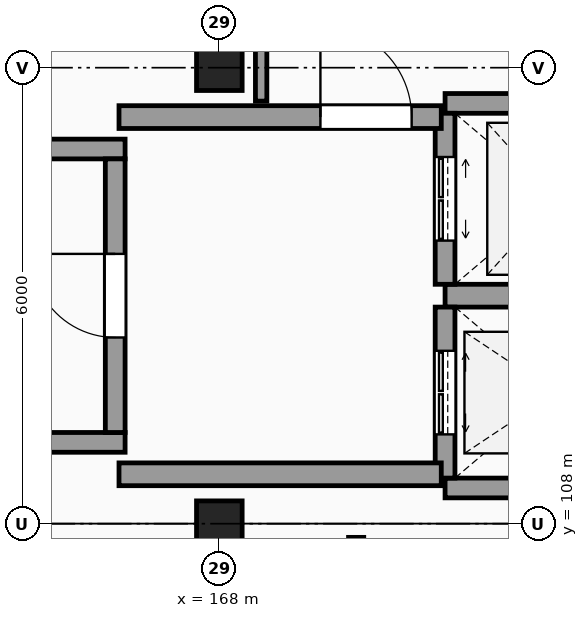
"""IFC4 building model, lengths in metres.
Left out: names, types, materials, properties, quantities, classifications, styles, units other than length and angle.
Written with IfcOpenShell. Run it as: python <this file> out.ifc"""

import sys

from ifc_helpers import new_model, si_unit, direction, frame, frame_2d, origin, origin_2d, place, context, subcontext, project, spatial, rectangle, extrude, element, fill, save


model = new_model("IFC4")
c1 = context("Model", 3, precision=1e-05, world=origin(), true_north=direction((0.0, 1.0)))
c2 = subcontext(c1, "Body", "Model", "MODEL_VIEW")
j1 = project(units=[si_unit("LENGTHUNIT", "METRE"), si_unit("PLANEANGLEUNIT", "RADIAN")], contexts=[c1])
p1 = place(None, origin())
s1 = spatial("IfcSite", under=j1, at=p1, CompositionType="ELEMENT")
p2 = place(p1, origin())
s2 = spatial("IfcBuilding", under=s1, at=p2, CompositionType="ELEMENT")
p3 = place(p2, frame((0.0, 0.0, 24.6)))
s3 = spatial("IfcBuildingStorey", under=s2, at=p3, CompositionType="ELEMENT", Elevation=24.6)
for number, where, z_axis, x_axis in (
    (1, (168.0, 108.0, 0.0), (0.0, 0.0, 1.0), (1.0, 0.0, 0.0)),
    (2, (168.0, 114.0, 0.0), (0.0, 0.0, 1.0), (1.0, 0.0, 0.0)),
):
    element("IfcColumn", number, at=place(p3, frame(where, z_axis=z_axis, x_axis=x_axis)), inside=s3, PredefinedType="COLUMN", context=c2, shape_type="SweptSolid", body=[
        extrude(rectangle(XDim=0.6, YDim=0.6, at=origin_2d()), origin(), (0.0, 0.0, 1.0), 3.6),
    ])
for number, where, z_axis, x_axis in (
    (3, (156.04, 109.07, 0.0), (0.0, 0.0, 1.0), (1.0, 0.0, 0.0)),
    (4, (156.04, 112.93, 0.0), (0.0, 0.0, 1.0), (1.0, 0.0, 0.0)),
):
    element("IfcWall", number, at=place(p3, frame(where, z_axis=z_axis, x_axis=x_axis)), inside=s3, PredefinedType="SHEAR", context=c2, shape_type="SweptSolid", body=[
        extrude(rectangle(XDim=10.72, YDim=0.26, at=frame_2d((5.36, 0.0))), origin(), (0.0, 0.0, 1.0), 3.6),
    ])
p4 = place(p3, frame((166.63, 109.2, 0.0), z_axis=(0.0, 0.0, 1.0), x_axis=(0.0, 1.0, 0.0)))
e5 = element("IfcWall", 5, at=p4, inside=s3, PredefinedType="SHEAR", context=c2, shape_type="SweptSolid", body=[
    extrude(rectangle(XDim=3.6, YDim=0.26, at=frame_2d((1.8, 0.0))), origin(), (0.0, 0.0, 1.0), 3.6),
])
p5 = place(p4, frame((1.25, 0.0, 0.0)))
e6 = element("IfcOpeningElement", 6, at=p5, cuts=e5, PredefinedType="OPENING", context=c2, shape_type="SweptSolid", body=[
    extrude(rectangle(XDim=1.1, YDim=2.15, at=frame_2d((0.55, 1.075))), frame((0.0, 0.14, 0.0), z_axis=(0.0, -1.0, 0.0), x_axis=(1.0, 0.0, 0.0)), (0.0, 0.0, 1.0), 0.28),
])
p6 = place(p3, frame((170.97, 108.47, 0.0), z_axis=(0.0, 0.0, 1.0), x_axis=(1.0, 0.0, 0.0)))
e7 = element("IfcWall", 7, at=p6, inside=s3, PredefinedType="SHEAR", context=c2, shape_type="SweptSolid", body=[
    extrude(rectangle(XDim=2.91, YDim=0.26, at=frame_2d((1.455, 0.0))), origin(), (0.0, 0.0, 1.0), 3.6),
])
p7 = place(p3, frame((170.97, 111.0, 0.0), z_axis=(0.0, 0.0, 1.0), x_axis=(1.0, 0.0, 0.0)))
e8 = element("IfcWall", 8, at=p7, inside=s3, PredefinedType="SHEAR", context=c2, shape_type="SweptSolid", body=[
    extrude(rectangle(XDim=2.91, YDim=0.3, at=frame_2d((1.455, 0.0))), origin(), (0.0, 0.0, 1.0), 3.6),
])
p8 = place(p3, frame((170.97, 108.6, 0.0), z_axis=(0.0, 0.0, 1.0), x_axis=(0.0, 1.0, 0.0)))
e9 = element("IfcWall", 9, at=p8, inside=s3, PredefinedType="SHEAR", context=c2, shape_type="SweptSolid", body=[
    extrude(rectangle(XDim=2.25, YDim=0.26, at=frame_2d((1.125, 0.0))), origin(), (0.0, 0.0, 1.0), 3.6),
])
p9 = place(p8, frame((0.575, 0.0, 0.0)))
e10 = element("IfcOpeningElement", 10, at=p9, cuts=e9, PredefinedType="OPENING", context=c2, shape_type="SweptSolid", body=[
    extrude(rectangle(XDim=1.1, YDim=2.2, at=frame_2d((0.55, 1.1))), frame((0.0, 0.14, 0.0), z_axis=(0.0, -1.0, 0.0), x_axis=(1.0, 0.0, 0.0)), (0.0, 0.0, 1.0), 0.28),
])
p10 = place(p3, frame((170.97, 113.53, 0.0), z_axis=(0.0, 0.0, 1.0), x_axis=(1.0, 0.0, 0.0)))
e11 = element("IfcWall", 11, at=p10, inside=s3, PredefinedType="SHEAR", context=c2, shape_type="SweptSolid", body=[
    extrude(rectangle(XDim=2.91, YDim=0.26, at=frame_2d((1.455, 0.0))), origin(), (0.0, 0.0, 1.0), 3.6),
])
p11 = place(p3, frame((170.97, 111.15, 0.0), z_axis=(0.0, 0.0, 1.0), x_axis=(0.0, 1.0, 0.0)))
e12 = element("IfcWall", 12, at=p11, inside=s3, PredefinedType="SHEAR", context=c2, shape_type="SweptSolid", body=[
    extrude(rectangle(XDim=2.25, YDim=0.26, at=frame_2d((1.125, 0.0))), origin(), (0.0, 0.0, 1.0), 3.6),
])
p12 = place(p11, frame((0.575, 0.0, 0.0)))
e13 = element("IfcOpeningElement", 13, at=p12, cuts=e12, PredefinedType="OPENING", context=c2, shape_type="SweptSolid", body=[
    extrude(rectangle(XDim=1.1, YDim=2.2, at=frame_2d((0.55, 1.1))), frame((0.0, 0.14, 0.0), z_axis=(0.0, -1.0, 0.0), x_axis=(1.0, 0.0, 0.0)), (0.0, 0.0, 1.0), 0.28),
])
p13 = place(p3, frame((166.68, 113.35, 0.0), z_axis=(0.0, 0.0, 1.0), x_axis=(1.0, 0.0, 0.0)))
e14 = element("IfcWall", 14, at=p13, inside=s3, PredefinedType="SHEAR", context=c2, shape_type="SweptSolid", body=[
    extrude(rectangle(XDim=4.24, YDim=0.3, at=frame_2d((2.12, 0.0))), origin(), (0.0, 0.0, 1.0), 3.6),
])
p14 = place(p13, frame((2.65, 0.0, 0.0)))
e15 = element("IfcOpeningElement", 15, at=p14, cuts=e14, PredefinedType="OPENING", context=c2, shape_type="SweptSolid", body=[
    extrude(rectangle(XDim=1.2, YDim=2.2, at=frame_2d((0.6, 1.1))), frame((0.0, 0.16, 0.0), z_axis=(0.0, -1.0, 0.0), x_axis=(1.0, 0.0, 0.0)), (0.0, 0.0, 1.0), 0.32),
])
p15 = place(p3, frame((166.68, 108.65, 0.0), z_axis=(0.0, 0.0, 1.0), x_axis=(1.0, 0.0, 0.0)))
e16 = element("IfcWall", 16, at=p15, inside=s3, PredefinedType="SHEAR", context=c2, shape_type="SweptSolid", body=[
    extrude(rectangle(XDim=4.24, YDim=0.3, at=frame_2d((2.12, 0.0))), origin(), (0.0, 0.0, 1.0), 3.6),
])
p16 = place(p3, frame((168.55, 113.56, 0.0), z_axis=(0.0, 0.0, 1.0), x_axis=(0.0, 1.0, 0.0)))
e17 = element("IfcWall", 17, at=p16, inside=s3, PredefinedType="PARTITIONING", context=c2, shape_type="SweptSolid", body=[
    extrude(rectangle(XDim=2.24, YDim=0.15, at=frame_2d((1.12, 0.0))), origin(), (0.0, 0.0, 1.0), 3.38),
])
p17 = place(p3, frame((169.8, 42.215, 0.0), z_axis=(0.0, 0.0, 1.0), x_axis=(0.0, 1.0, 0.0)))
e18 = element("IfcWall", 18, at=p17, inside=s3, PredefinedType="PARTITIONING", context=c2, shape_type="SweptSolid", body=[
    extrude(rectangle(XDim=65.605, YDim=0.2, at=frame_2d((32.802, 0.0))), origin(), (0.0, 0.0, 1.0), 3.38),
])
p18 = place(p17, frame((50.185, 0.0, 0.0)))
e19 = element("IfcOpeningElement", 19, at=p18, cuts=e18, PredefinedType="OPENING", context=c2, shape_type="SweptSolid", body=[
    extrude(rectangle(XDim=1.2, YDim=2.2, at=frame_2d((0.6, 1.1))), frame((0.0, 0.11, 0.0), z_axis=(0.0, -1.0, 0.0), x_axis=(1.0, 0.0, 0.0)), (0.0, 0.0, 1.0), 0.22),
])
p19 = place(p17, frame((0.46, 0.0, 0.0)))
e20 = element("IfcOpeningElement", 20, at=p19, cuts=e18, PredefinedType="OPENING", context=c2, shape_type="SweptSolid", body=[
    extrude(rectangle(XDim=0.95, YDim=2.1, at=frame_2d((0.475, 1.05))), frame((0.0, 0.11, 0.0), z_axis=(0.0, -1.0, 0.0), x_axis=(1.0, 0.0, 0.0)), (0.0, 0.0, 1.0), 0.22),
])
p20 = place(p17, frame((6.51, 0.0, 0.0)))
e21 = element("IfcOpeningElement", 21, at=p20, cuts=e18, PredefinedType="OPENING", context=c2, shape_type="SweptSolid", body=[
    extrude(rectangle(XDim=0.95, YDim=2.1, at=frame_2d((0.475, 1.05))), frame((0.0, 0.11, 0.0), z_axis=(0.0, -1.0, 0.0), x_axis=(1.0, 0.0, 0.0)), (0.0, 0.0, 1.0), 0.22),
])
p21 = place(p17, frame((12.51, 0.0, 0.0)))
e22 = element("IfcOpeningElement", 22, at=p21, cuts=e18, PredefinedType="OPENING", context=c2, shape_type="SweptSolid", body=[
    extrude(rectangle(XDim=0.95, YDim=2.1, at=frame_2d((0.475, 1.05))), frame((0.0, 0.11, 0.0), z_axis=(0.0, -1.0, 0.0), x_axis=(1.0, 0.0, 0.0)), (0.0, 0.0, 1.0), 0.22),
])
p22 = place(p17, frame((18.51, 0.0, 0.0)))
e23 = element("IfcOpeningElement", 23, at=p22, cuts=e18, PredefinedType="OPENING", context=c2, shape_type="SweptSolid", body=[
    extrude(rectangle(XDim=0.95, YDim=2.1, at=frame_2d((0.475, 1.05))), frame((0.0, 0.11, 0.0), z_axis=(0.0, -1.0, 0.0), x_axis=(1.0, 0.0, 0.0)), (0.0, 0.0, 1.0), 0.22),
])
p23 = place(p17, frame((24.51, 0.0, 0.0)))
e24 = element("IfcOpeningElement", 24, at=p23, cuts=e18, PredefinedType="OPENING", context=c2, shape_type="SweptSolid", body=[
    extrude(rectangle(XDim=0.95, YDim=2.1, at=frame_2d((0.475, 1.05))), frame((0.0, 0.11, 0.0), z_axis=(0.0, -1.0, 0.0), x_axis=(1.0, 0.0, 0.0)), (0.0, 0.0, 1.0), 0.22),
])
p24 = place(p17, frame((30.51, 0.0, 0.0)))
e25 = element("IfcOpeningElement", 25, at=p24, cuts=e18, PredefinedType="OPENING", context=c2, shape_type="SweptSolid", body=[
    extrude(rectangle(XDim=0.95, YDim=2.1, at=frame_2d((0.475, 1.05))), frame((0.0, 0.11, 0.0), z_axis=(0.0, -1.0, 0.0), x_axis=(1.0, 0.0, 0.0)), (0.0, 0.0, 1.0), 0.22),
])
p25 = place(p17, frame((54.51, 0.0, 0.0)))
e26 = element("IfcOpeningElement", 26, at=p25, cuts=e18, PredefinedType="OPENING", context=c2, shape_type="SweptSolid", body=[
    extrude(rectangle(XDim=0.95, YDim=2.1, at=frame_2d((0.475, 1.05))), frame((0.0, 0.11, 0.0), z_axis=(0.0, -1.0, 0.0), x_axis=(1.0, 0.0, 0.0)), (0.0, 0.0, 1.0), 0.22),
])
p26 = place(p17, frame((60.51, 0.0, 0.0)))
e27 = element("IfcOpeningElement", 27, at=p26, cuts=e18, PredefinedType="OPENING", context=c2, shape_type="SweptSolid", body=[
    extrude(rectangle(XDim=0.95, YDim=2.1, at=frame_2d((0.475, 1.05))), frame((0.0, 0.11, 0.0), z_axis=(0.0, -1.0, 0.0), x_axis=(1.0, 0.0, 0.0)), (0.0, 0.0, 1.0), 0.22),
])
p27 = place(p5, origin())
e28 = element("IfcDoor", 28, at=p27, inside=s3, OperationType="SINGLE_SWING_RIGHT", PredefinedType="DOOR", context=c2, shape_type="SweptSolid", body=[
    extrude(rectangle(XDim=1.1, YDim=2.15, at=frame_2d((0.55, 1.075))), frame((0.0, 0.025, 0.0), z_axis=(0.0, -1.0, 0.0), x_axis=(1.0, 0.0, 0.0)), (0.0, 0.0, 1.0), 0.05),
])
fill(e6, e28)
p28 = place(p9, origin())
e29 = element("IfcDoor", 29, at=p28, inside=s3, OperationType="DOUBLE_DOOR_SLIDING", PredefinedType="DOOR", context=c2, shape_type="SweptSolid", body=[
    extrude(rectangle(XDim=1.1, YDim=2.2, at=frame_2d((0.55, 1.1))), frame((0.0, 0.025, 0.0), z_axis=(0.0, -1.0, 0.0), x_axis=(1.0, 0.0, 0.0)), (0.0, 0.0, 1.0), 0.05),
])
fill(e10, e29)
p29 = place(p12, origin())
e30 = element("IfcDoor", 30, at=p29, inside=s3, OperationType="DOUBLE_DOOR_SLIDING", PredefinedType="DOOR", context=c2, shape_type="SweptSolid", body=[
    extrude(rectangle(XDim=1.1, YDim=2.2, at=frame_2d((0.55, 1.1))), frame((0.0, 0.025, 0.0), z_axis=(0.0, -1.0, 0.0), x_axis=(1.0, 0.0, 0.0)), (0.0, 0.0, 1.0), 0.05),
])
fill(e13, e30)
p30 = place(p14, origin())
e31 = element("IfcDoor", 31, at=p30, inside=s3, OperationType="SINGLE_SWING_LEFT", PredefinedType="DOOR", context=c2, shape_type="SweptSolid", body=[
    extrude(rectangle(XDim=1.2, YDim=2.2, at=frame_2d((0.6, 1.1))), frame((0.0, 0.025, 0.0), z_axis=(0.0, -1.0, 0.0), x_axis=(1.0, 0.0, 0.0)), (0.0, 0.0, 1.0), 0.05),
])
fill(e15, e31)
save(model, sys.argv[1])
